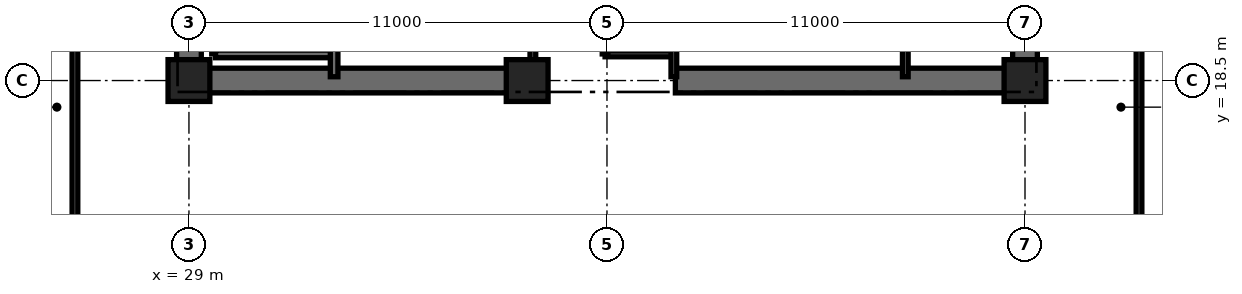
"""IFC4 building model, lengths in metres.
Left out: names, types, materials, properties, quantities, classifications, styles, units other than length and angle.
Written with IfcOpenShell. Run it as: python <this file> out.ifc"""

import sys

from ifc_helpers import new_model, si_unit, direction, frame, frame_2d, origin, origin_2d, place, context, subcontext, project, spatial, rectangle, extrude, element, save


model = new_model("IFC4")
c1 = context("Model", 3, precision=1e-05, world=origin(), true_north=direction((0.0, 1.0)))
c2 = subcontext(c1, "Body", "Model", "MODEL_VIEW")
j1 = project(units=[si_unit("LENGTHUNIT", "METRE"), si_unit("PLANEANGLEUNIT", "RADIAN")], contexts=[c1])
p1 = place(None, origin())
s1 = spatial("IfcSite", under=j1, at=p1, CompositionType="ELEMENT")
p2 = place(p1, origin())
s2 = spatial("IfcBuilding", under=s1, at=p2, CompositionType="ELEMENT")
p3 = place(p2, frame((0.0, 0.0, -4.5)))
s3 = spatial("IfcBuildingStorey", under=s2, at=p3, CompositionType="ELEMENT", Elevation=-4.5)
for number, where, z_axis, x_axis in (
    (1, (29.0, 18.5, 0.0), (0.0, 0.0, 1.0), (1.0, 0.0, 0.0)),
    (2, (51.0, 18.5, 0.0), (0.0, 0.0, 1.0), (1.0, 0.0, 0.0)),
    (3, (37.9, 18.5, 0.0), (0.0, 0.0, 1.0), (1.0, 0.0, 0.0)),
):
    element("IfcColumn", number, at=place(p3, frame(where, z_axis=z_axis, x_axis=x_axis)), inside=s3, PredefinedType="PILASTER", context=c2, shape_type="SweptSolid", body=[
        extrude(rectangle(XDim=1.1, YDim=1.1, at=origin_2d()), origin(), (0.0, 0.0, 1.0), 4.5),
    ])
for number, where, z_axis, x_axis in (
    (4, (29.0, 18.5, 0.0), (0.0, 0.0, 1.0), (1.0, 0.0, 0.0)),
    (5, (41.8, 18.5, 0.0), (0.0, 0.0, 1.0), (1.0, 0.0, 0.0)),
):
    element("IfcWall", number, at=place(p3, frame(where, z_axis=z_axis, x_axis=x_axis)), inside=s3, PredefinedType="SHEAR", context=c2, shape_type="SweptSolid", body=[
        extrude(rectangle(XDim=9.2, YDim=0.65, at=frame_2d((4.6, 0.0))), origin(), (0.0, 0.0, 1.0), 4.22),
    ])
p4 = place(p3, frame((29.0, 18.5, 0.0), z_axis=(0.0, 0.0, 1.0), x_axis=(0.0, 1.0, 0.0)))
e6 = element("IfcWall", 6, at=p4, inside=s3, PredefinedType="SHEAR", context=c2, shape_type="SweptSolid", body=[
    extrude(rectangle(XDim=8.8, YDim=0.65, at=frame_2d((4.4, 0.0))), origin(), (0.0, 0.0, 1.0), 4.22),
])
p5 = place(p3, frame((51.0, 18.5, 0.0), z_axis=(0.0, 0.0, 1.0), x_axis=(0.0, 1.0, 0.0)))
e7 = element("IfcWall", 7, at=p5, inside=s3, PredefinedType="SHEAR", context=c2, shape_type="SweptSolid", body=[
    extrude(rectangle(XDim=5.8, YDim=0.65, at=frame_2d((2.9, 0.0))), origin(), (0.0, 0.0, 1.0), 4.22),
])
p6 = place(p3, frame((29.7, 19.2, 0.0), z_axis=(0.0, 0.0, 1.0), x_axis=(0.0, 1.0, 0.0)))
e8 = element("IfcWall", 8, at=p6, inside=s3, PredefinedType="SOLIDWALL", context=c2, shape_type="SweptSolid", body=[
    extrude(rectangle(XDim=8.15, YDim=0.2, at=frame_2d((4.075, 0.0))), origin(), (0.0, 0.0, 1.0), 4.22),
])
p7 = place(p3, frame((29.7, 19.2, 0.0), z_axis=(0.0, 0.0, 1.0), x_axis=(1.0, 0.0, 0.0)))
e9 = element("IfcWall", 9, at=p7, inside=s3, PredefinedType="SOLIDWALL", context=c2, shape_type="SweptSolid", body=[
    extrude(rectangle(XDim=3.12, YDim=0.2, at=frame_2d((1.56, 0.0))), origin(), (0.0, 0.0, 1.0), 4.22),
])
p8 = place(p3, frame((32.82, 18.6, 0.0), z_axis=(0.0, 0.0, 1.0), x_axis=(0.0, 1.0, 0.0)))
e10 = element("IfcWall", 10, at=p8, inside=s3, PredefinedType="SOLIDWALL", context=c2, shape_type="SweptSolid", body=[
    extrude(rectangle(XDim=8.78, YDim=0.2, at=frame_2d((4.39, 0.0))), origin(), (0.0, 0.0, 1.0), 4.22),
])
p9 = place(p3, frame((39.95, 19.2, 0.0), z_axis=(0.0, 0.0, 1.0), x_axis=(1.0, 0.0, 0.0)))
e11 = element("IfcWall", 11, at=p9, inside=s3, PredefinedType="PARTITIONING", context=c2, shape_type="SweptSolid", body=[
    extrude(rectangle(XDim=1.81, YDim=0.15, at=frame_2d((0.905, 0.0))), origin(), (0.0, 0.0, 1.0), 2.85),
])
p10 = place(p3, frame((41.76, 18.6, 0.0), z_axis=(0.0, 0.0, 1.0), x_axis=(0.0, 1.0, 0.0)))
e12 = element("IfcWall", 12, at=p10, inside=s3, PredefinedType="PARTITIONING", context=c2, shape_type="SweptSolid", body=[
    extrude(rectangle(XDim=3.6, YDim=0.15, at=frame_2d((1.8, 0.0))), origin(), (0.0, 0.0, 1.0), 2.85),
])
p11 = place(p3, frame((39.95, 19.2, 0.0), z_axis=(0.0, 0.0, 1.0), x_axis=(0.0, 1.0, 0.0)))
e13 = element("IfcWall", 13, at=p11, inside=s3, PredefinedType="PARTITIONING", context=c2, shape_type="SweptSolid", body=[
    extrude(rectangle(XDim=3.0, YDim=0.15, at=frame_2d((1.5, 0.0))), origin(), (0.0, 0.0, 1.0), 2.85),
])
p12 = place(p11, frame((1.05, 0.0, 0.0)))
e14 = element("IfcOpeningElement", 14, at=p12, cuts=e13, PredefinedType="OPENING", context=c2, shape_type="SweptSolid", body=[
    extrude(rectangle(XDim=0.9, YDim=2.1, at=frame_2d((0.45, 1.05))), frame((0.0, 0.075, 0.0), z_axis=(0.0, -1.0, 0.0), x_axis=(1.0, 0.0, 0.0)), (0.0, 0.0, 1.0), 0.15),
])
p13 = place(p3, frame((38.05, 18.6, 0.0), z_axis=(0.0, 0.0, 1.0), x_axis=(0.0, 1.0, 0.0)))
e15 = element("IfcWall", 15, at=p13, inside=s3, PredefinedType="PARTITIONING", context=c2, shape_type="SweptSolid", body=[
    extrude(rectangle(XDim=4.46, YDim=0.15, at=frame_2d((2.23, 0.0))), origin(), (0.0, 0.0, 1.0), 2.85),
])
p14 = place(p13, frame((1.79, 0.0, 0.0)))
e16 = element("IfcOpeningElement", 16, at=p14, cuts=e15, PredefinedType="OPENING", context=c2, shape_type="SweptSolid", body=[
    extrude(rectangle(XDim=0.88, YDim=2.1, at=frame_2d((0.44, 1.05))), frame((0.0, 0.075, 0.0), z_axis=(0.0, -1.0, 0.0), x_axis=(1.0, 0.0, 0.0)), (0.0, 0.0, 1.0), 0.15),
])
p15 = place(p3, frame((47.85, 18.6, 0.0), z_axis=(0.0, 0.0, 1.0), x_axis=(0.0, 1.0, 0.0)))
e17 = element("IfcWall", 17, at=p15, inside=s3, PredefinedType="PARTITIONING", context=c2, shape_type="SweptSolid", body=[
    extrude(rectangle(XDim=2.54, YDim=0.15, at=frame_2d((1.27, 0.0))), origin(), (0.0, 0.0, 1.0), 2.85),
])
p16 = place(p3, frame((26.0, 14.0, 0.0), z_axis=(0.0, 0.0, 1.0), x_axis=(0.0, 1.0, 0.0)))
e18 = element("IfcWall", 18, at=p16, inside=s3, PredefinedType="PARTITIONING", context=c2, shape_type="SweptSolid", body=[
    extrude(rectangle(XDim=12.2, YDim=0.15, at=frame_2d((6.1, 0.0))), origin(), (0.0, 0.0, 1.0), 2.85),
])
p17 = place(p16, frame((7.6, 0.0, 0.0)))
e19 = element("IfcOpeningElement", 19, at=p17, cuts=e18, PredefinedType="OPENING", context=c2, shape_type="SweptSolid", body=[
    extrude(rectangle(XDim=1.6, YDim=2.25, at=frame_2d((0.8, 1.125))), frame((0.0, 0.075, 0.0), z_axis=(0.0, -1.0, 0.0), x_axis=(1.0, 0.0, 0.0)), (0.0, 0.0, 1.0), 0.15),
])
p18 = place(p3, frame((54.0, 14.0, 0.0), z_axis=(0.0, 0.0, 1.0), x_axis=(0.0, 1.0, 0.0)))
e20 = element("IfcWall", 20, at=p18, inside=s3, PredefinedType="PARTITIONING", context=c2, shape_type="SweptSolid", body=[
    extrude(rectangle(XDim=12.2, YDim=0.15, at=frame_2d((6.1, 0.0))), origin(), (0.0, 0.0, 1.0), 2.85),
])
p19 = place(p18, frame((7.6, 0.0, 0.0)))
e21 = element("IfcOpeningElement", 21, at=p19, cuts=e20, PredefinedType="OPENING", context=c2, shape_type="SweptSolid", body=[
    extrude(rectangle(XDim=1.6, YDim=2.25, at=frame_2d((0.8, 1.125))), frame((0.0, 0.075, 0.0), z_axis=(0.0, -1.0, 0.0), x_axis=(1.0, 0.0, 0.0)), (0.0, 0.0, 1.0), 0.15),
])
save(model, sys.argv[1])
